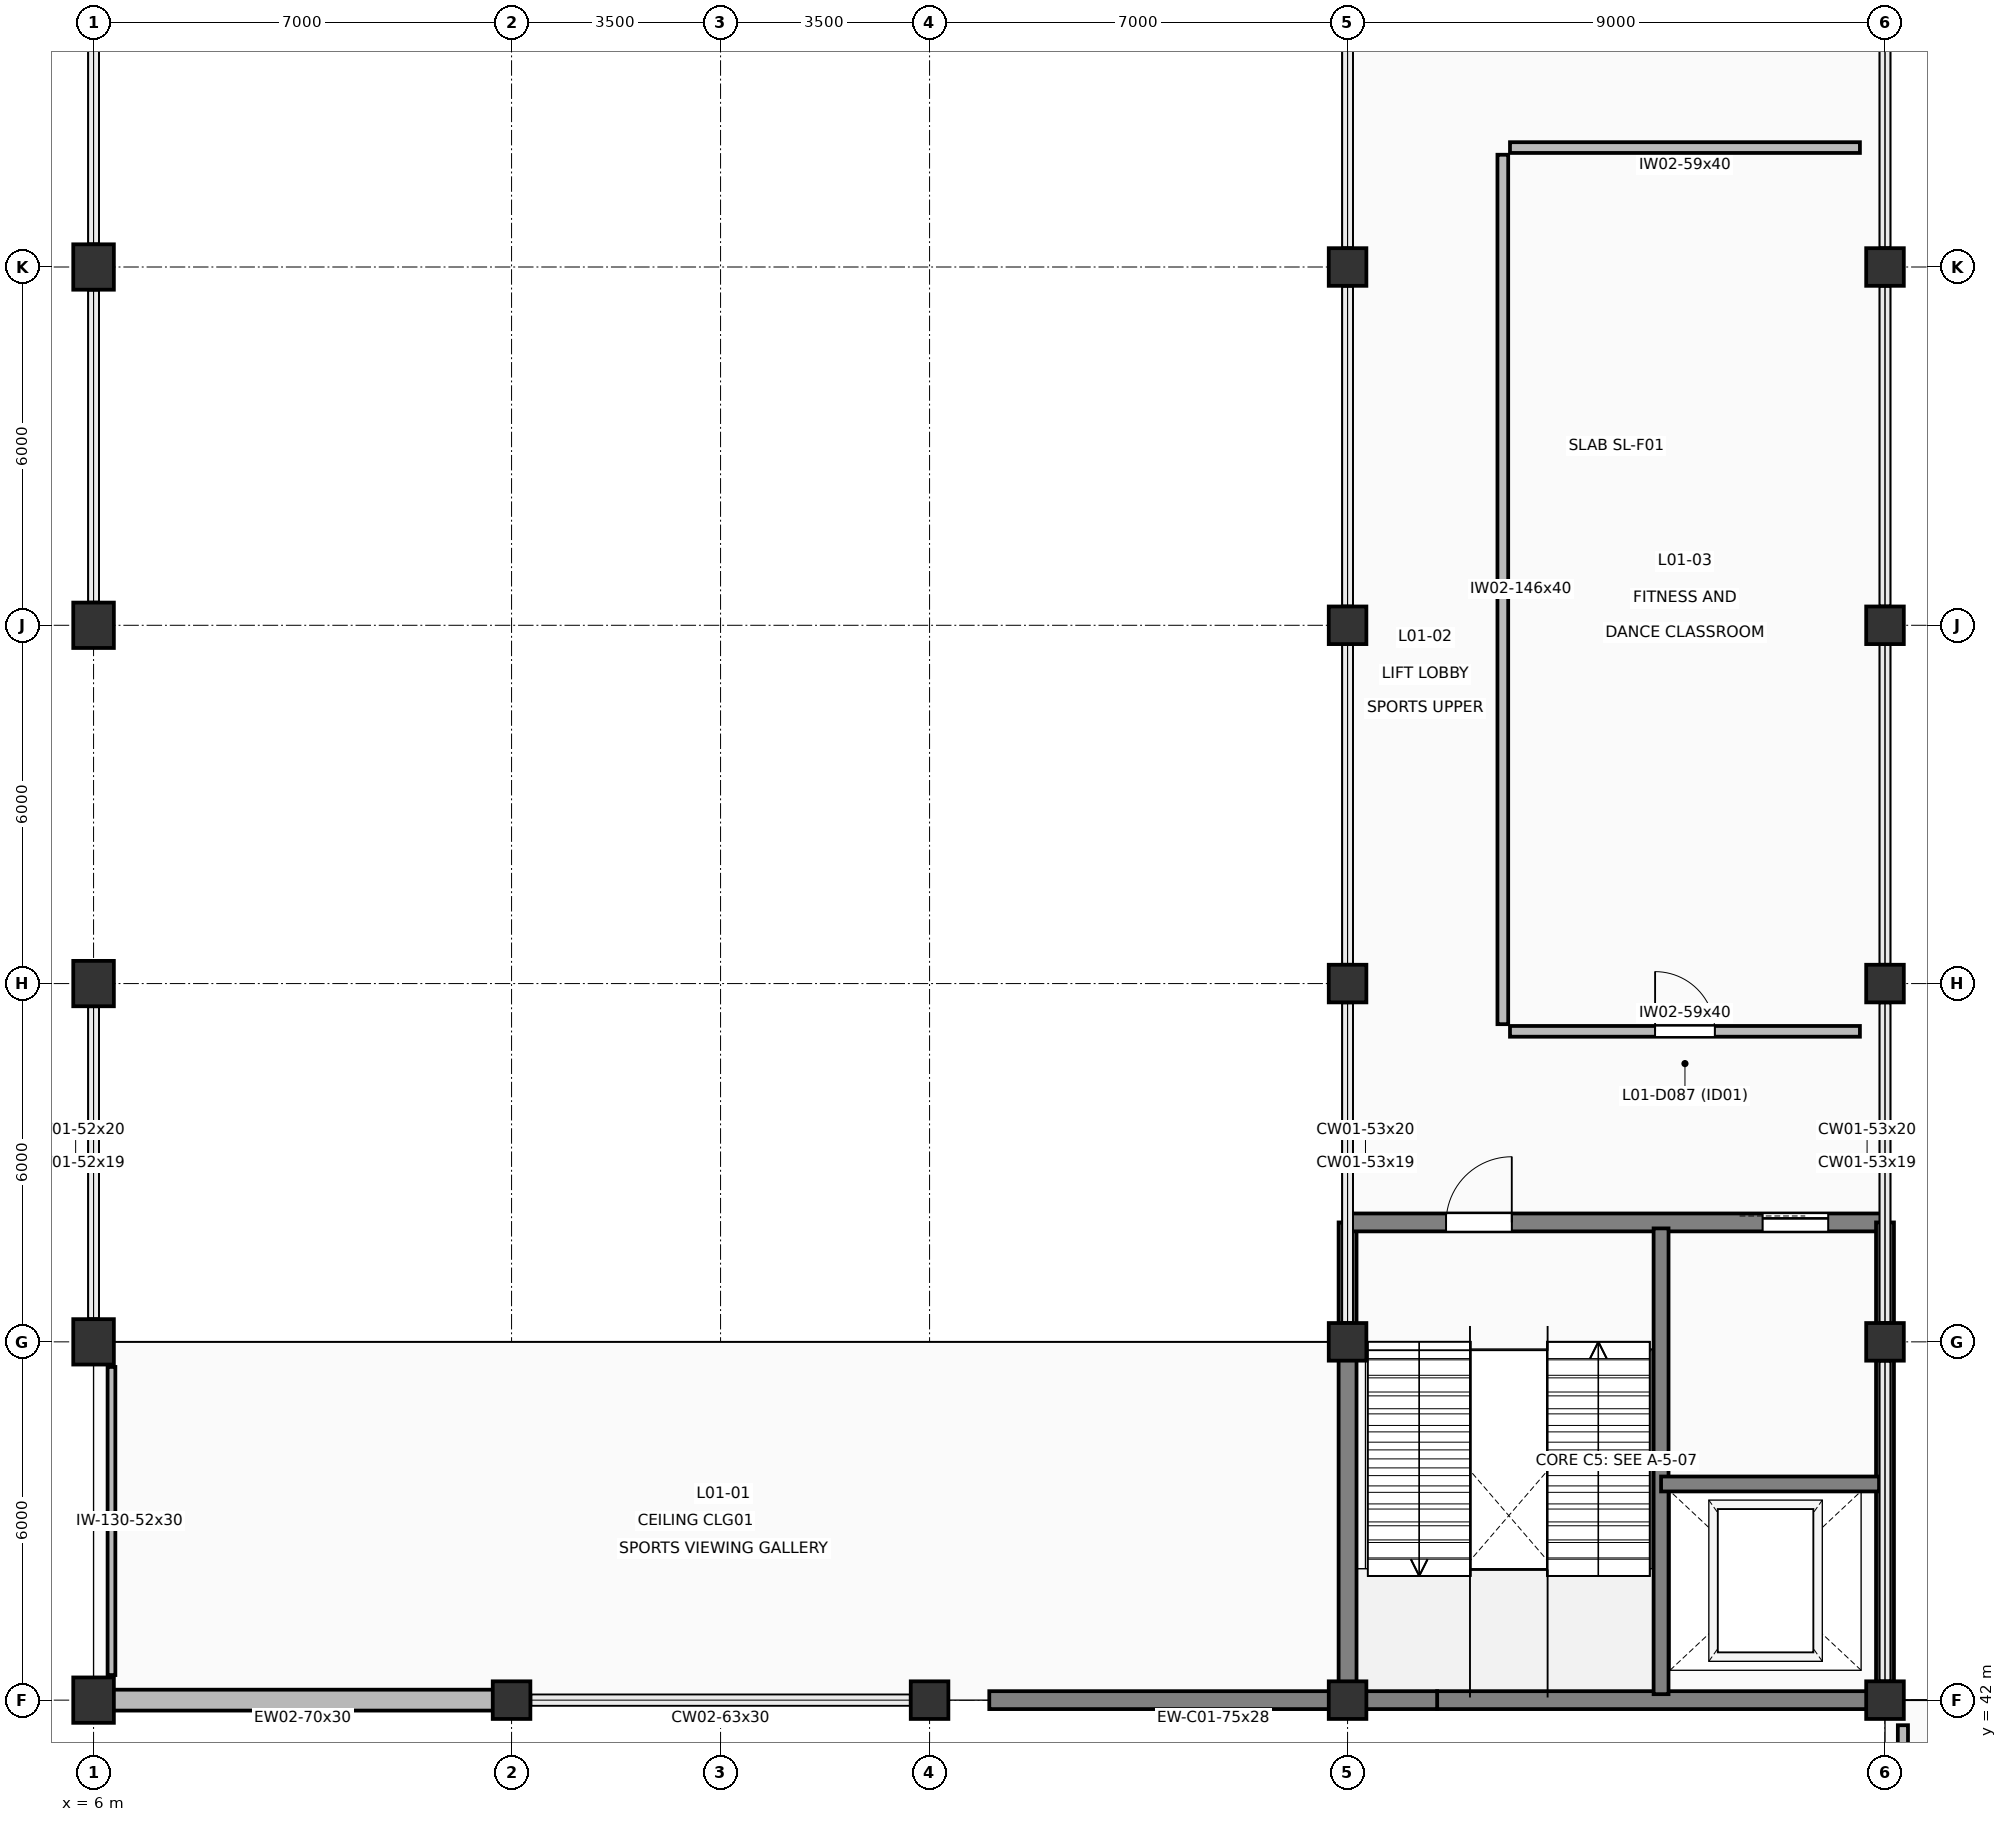
"""IFC4 building model, lengths in metres.
Left out: names, types, materials, properties, quantities, classifications, styles, units other than length and angle.
Written with IfcOpenShell. Run it as: python <this file> out.ifc"""

import sys

from ifc_helpers import new_model, si_unit, direction, frame, frame_2d, origin, origin_2d, place, context, subcontext, project, spatial, rectangle, extrude, element, fill, save


model = new_model("IFC4")
c1 = context("Model", 3, precision=1e-05, world=origin(), true_north=direction((0.0, 1.0)))
c2 = subcontext(c1, "Body", "Model", "MODEL_VIEW")
j1 = project(units=[si_unit("LENGTHUNIT", "METRE"), si_unit("PLANEANGLEUNIT", "RADIAN")], contexts=[c1])
p1 = place(None, origin())
s1 = spatial("IfcSite", under=j1, at=p1, CompositionType="ELEMENT")
p2 = place(p1, origin())
s2 = spatial("IfcBuilding", under=s1, at=p2, CompositionType="ELEMENT")
p3 = place(p2, frame((0.0, 0.0, 5.4)))
s3 = spatial("IfcBuildingStorey", under=s2, at=p3, CompositionType="ELEMENT", Elevation=5.4)
for number, where, z_axis, x_axis in (
    (1, (6.0, 42.0, 0.0), (0.0, 0.0, 1.0), (1.0, 0.0, 0.0)),
    (2, (6.0, 48.0, 0.0), (0.0, 0.0, 1.0), (1.0, 0.0, 0.0)),
    (3, (6.0, 54.0, 0.0), (0.0, 0.0, 1.0), (1.0, 0.0, 0.0)),
    (4, (6.0, 60.0, 0.0), (0.0, 0.0, 1.0), (1.0, 0.0, 0.0)),
    (5, (6.0, 66.0, 0.0), (0.0, 0.0, 1.0), (1.0, 0.0, 0.0)),
):
    element("IfcColumn", number, at=place(p3, frame(where, z_axis=z_axis, x_axis=x_axis)), inside=s3, PredefinedType="PILASTER", context=c2, shape_type="SweptSolid", body=[
        extrude(rectangle(XDim=0.68, YDim=0.76, at=origin_2d()), origin(), (0.0, 0.0, 1.0), 4.2),
    ])
for number, where, z_axis, x_axis in (
    (6, (13.0, 42.0, 0.0), (0.0, 0.0, 1.0), (1.0, 0.0, 0.0)),
    (7, (20.0, 42.0, 0.0), (0.0, 0.0, 1.0), (1.0, 0.0, 0.0)),
    (8, (27.0, 42.0, 0.0), (0.0, 0.0, 1.0), (1.0, 0.0, 0.0)),
    (9, (27.0, 48.0, 0.0), (0.0, 0.0, 1.0), (1.0, 0.0, 0.0)),
    (10, (27.0, 54.0, 0.0), (0.0, 0.0, 1.0), (1.0, 0.0, 0.0)),
    (11, (27.0, 60.0, 0.0), (0.0, 0.0, 1.0), (1.0, 0.0, 0.0)),
    (12, (27.0, 66.0, 0.0), (0.0, 0.0, 1.0), (1.0, 0.0, 0.0)),
    (13, (36.0, 42.0, 0.0), (0.0, 0.0, 1.0), (1.0, 0.0, 0.0)),
    (14, (36.0, 48.0, 0.0), (0.0, 0.0, 1.0), (1.0, 0.0, 0.0)),
    (15, (36.0, 54.0, 0.0), (0.0, 0.0, 1.0), (1.0, 0.0, 0.0)),
    (16, (36.0, 60.0, 0.0), (0.0, 0.0, 1.0), (1.0, 0.0, 0.0)),
    (17, (36.0, 66.0, 0.0), (0.0, 0.0, 1.0), (1.0, 0.0, 0.0)),
):
    element("IfcColumn", number, at=place(p3, frame(where, z_axis=z_axis, x_axis=x_axis)), inside=s3, PredefinedType="COLUMN", context=c2, shape_type="SweptSolid", body=[
        extrude(rectangle(XDim=0.63, YDim=0.63, at=origin_2d()), origin(), (0.0, 0.0, 1.0), 4.2),
    ])
for number, where, z_axis, x_axis in (
    (18, (36.0, 42.0, 0.0), (0.0, 0.0, 1.0), (-1.0, 0.0, 0.0)),
    (19, (28.5, 42.0, 0.0), (0.0, 0.0, 1.0), (-1.0, 0.0, 0.0)),
):
    element("IfcWall", number, at=place(p3, frame(where, z_axis=z_axis, x_axis=x_axis)), inside=s3, PredefinedType="SOLIDWALL", context=c2, shape_type="SweptSolid", body=[
        extrude(rectangle(XDim=7.5, YDim=0.3, at=frame_2d((3.75, 0.0))), origin(), (0.0, 0.0, 1.0), 4.2),
    ])
p4 = place(p3, frame((13.0, 42.0, 0.0), z_axis=(0.0, 0.0, 1.0), x_axis=(-1.0, 0.0, 0.0)))
e20 = element("IfcWall", 20, at=p4, inside=s3, PredefinedType="SOLIDWALL", context=c2, shape_type="SweptSolid", body=[
    extrude(rectangle(XDim=7.0, YDim=0.35, at=frame_2d((3.5, 0.0))), origin(), (0.0, 0.0, 1.0), 2.965),
])
p5 = place(p3, frame((27.0, 42.0, 0.0), z_axis=(0.0, 0.0, 1.0), x_axis=(0.0, 1.0, 0.0)))
e21 = element("IfcWall", 21, at=p5, inside=s3, PredefinedType="SHEAR", context=c2, shape_type="SweptSolid", body=[
    extrude(rectangle(XDim=8.0, YDim=0.3, at=frame_2d((4.0, 0.0))), origin(), (0.0, 0.0, 1.0), 4.2),
])
p6 = place(p3, frame((27.0, 50.0, 0.0), z_axis=(0.0, 0.0, 1.0), x_axis=(1.0, 0.0, 0.0)))
e22 = element("IfcWall", 22, at=p6, inside=s3, PredefinedType="SHEAR", context=c2, shape_type="SweptSolid", body=[
    extrude(rectangle(XDim=9.0, YDim=0.3, at=frame_2d((4.5, 0.0))), origin(), (0.0, 0.0, 1.0), 4.2),
])
p7 = place(p6, frame((1.65, 0.0, 0.0)))
e23 = element("IfcOpeningElement", 23, at=p7, cuts=e22, PredefinedType="OPENING", context=c2, shape_type="SweptSolid", body=[
    extrude(rectangle(XDim=1.1, YDim=2.2, at=frame_2d((0.55, 1.1))), frame((0.0, 0.16, 0.0), z_axis=(0.0, -1.0, 0.0), x_axis=(1.0, 0.0, 0.0)), (0.0, 0.0, 1.0), 0.32),
])
p8 = place(p6, frame((6.95, 0.0, 0.0)))
e24 = element("IfcOpeningElement", 24, at=p8, cuts=e22, PredefinedType="OPENING", context=c2, shape_type="SweptSolid", body=[
    extrude(rectangle(XDim=1.1, YDim=2.2, at=frame_2d((0.55, 1.1))), frame((0.0, 0.16, 0.0), z_axis=(0.0, -1.0, 0.0), x_axis=(1.0, 0.0, 0.0)), (0.0, 0.0, 1.0), 0.32),
])
p9 = place(p3, frame((36.0, 50.0, 0.0), z_axis=(0.0, 0.0, 1.0), x_axis=(0.0, -1.0, 0.0)))
e25 = element("IfcWall", 25, at=p9, inside=s3, PredefinedType="SHEAR", context=c2, shape_type="SweptSolid", body=[
    extrude(rectangle(XDim=8.0, YDim=0.3, at=frame_2d((4.0, 0.0))), origin(), (0.0, 0.0, 1.0), 4.2),
])
p10 = place(p3, frame((32.25, 42.1, 0.0), z_axis=(0.0, 0.0, 1.0), x_axis=(0.0, 1.0, 0.0)))
e26 = element("IfcWall", 26, at=p10, inside=s3, PredefinedType="SHEAR", context=c2, shape_type="SweptSolid", body=[
    extrude(rectangle(XDim=7.8, YDim=0.25, at=frame_2d((3.9, 0.0))), origin(), (0.0, 0.0, 1.0), 4.2),
])
p11 = place(p3, frame((32.25, 45.62, 0.0), z_axis=(0.0, 0.0, 1.0), x_axis=(1.0, 0.0, 0.0)))
e27 = element("IfcWall", 27, at=p11, inside=s3, PredefinedType="SHEAR", context=c2, shape_type="SweptSolid", body=[
    extrude(rectangle(XDim=3.65, YDim=0.25, at=frame_2d((1.825, 0.0))), origin(), (0.0, 0.0, 1.0), 4.2),
])
p12 = place(p3, frame((6.3, 47.58, 0.0), z_axis=(0.0, 0.0, 1.0), x_axis=(0.0, -1.0, 0.0)))
e28 = element("IfcWall", 28, at=p12, inside=s3, PredefinedType="PARTITIONING", context=c2, shape_type="SweptSolid", body=[
    extrude(rectangle(XDim=5.16, YDim=0.13, at=frame_2d((2.58, 0.0))), origin(), (0.0, 0.0, 1.0), 2.965),
])
p13 = place(p3, frame((29.72, 53.2, 0.0), z_axis=(0.0, 0.0, 1.0), x_axis=(1.0, 0.0, 0.0)))
e29 = element("IfcWall", 29, at=p13, inside=s3, PredefinedType="PARTITIONING", context=c2, shape_type="SweptSolid", body=[
    extrude(rectangle(XDim=5.86, YDim=0.18, at=frame_2d((2.93, 0.0))), origin(), (0.0, 0.0, 1.0), 3.98),
])
p14 = place(p13, frame((2.43, 0.0, 0.0)))
e30 = element("IfcOpeningElement", 30, at=p14, cuts=e29, PredefinedType="OPENING", context=c2, shape_type="SweptSolid", body=[
    extrude(rectangle(XDim=1.0, YDim=2.15, at=frame_2d((0.5, 1.075))), frame((0.0, 0.1, 0.0), z_axis=(0.0, -1.0, 0.0), x_axis=(1.0, 0.0, 0.0)), (0.0, 0.0, 1.0), 0.2),
])
p15 = place(p3, frame((35.58, 68.0, 0.0), z_axis=(0.0, 0.0, 1.0), x_axis=(-1.0, 0.0, 0.0)))
e31 = element("IfcWall", 31, at=p15, inside=s3, PredefinedType="PARTITIONING", context=c2, shape_type="SweptSolid", body=[
    extrude(rectangle(XDim=5.86, YDim=0.18, at=frame_2d((2.93, 0.0))), origin(), (0.0, 0.0, 1.0), 3.98),
])
p16 = place(p3, frame((29.6, 67.88, 0.0), z_axis=(0.0, 0.0, 1.0), x_axis=(0.0, -1.0, 0.0)))
e32 = element("IfcWall", 32, at=p16, inside=s3, PredefinedType="PARTITIONING", context=c2, shape_type="SweptSolid", body=[
    extrude(rectangle(XDim=14.56, YDim=0.18, at=frame_2d((7.28, 0.0))), origin(), (0.0, 0.0, 1.0), 3.98),
])
p17 = place(p3, frame((36.3, 41.58, 0.0), z_axis=(0.0, 0.0, 1.0), x_axis=(0.0, -1.0, 0.0)))
e33 = element("IfcWall", 33, at=p17, inside=s3, PredefinedType="PARTITIONING", context=c2, shape_type="SweptSolid", body=[
    extrude(rectangle(XDim=5.26, YDim=0.17, at=frame_2d((2.63, 0.0))), origin(), (0.0, 0.0, 1.0), 2.965),
])
p18 = place(p7, origin())
e34 = element("IfcDoor", 34, at=p18, inside=s3, OperationType="SINGLE_SWING_RIGHT", PredefinedType="DOOR", context=c2, shape_type="SweptSolid", body=[
    extrude(rectangle(XDim=1.1, YDim=2.2, at=frame_2d((0.55, 1.1))), frame((0.0, 0.025, 0.0), z_axis=(0.0, -1.0, 0.0), x_axis=(1.0, 0.0, 0.0)), (0.0, 0.0, 1.0), 0.05),
])
fill(e23, e34)
p19 = place(p8, origin())
e35 = element("IfcDoor", 35, at=p19, inside=s3, OperationType="SLIDING_TO_LEFT", PredefinedType="DOOR", context=c2, shape_type="SweptSolid", body=[
    extrude(rectangle(XDim=1.1, YDim=2.2, at=frame_2d((0.55, 1.1))), frame((0.0, 0.025, 0.0), z_axis=(0.0, -1.0, 0.0), x_axis=(1.0, 0.0, 0.0)), (0.0, 0.0, 1.0), 0.05),
])
fill(e24, e35)
p20 = place(p14, origin())
e36 = element("IfcDoor", 36, at=p20, inside=s3, OperationType="SINGLE_SWING_LEFT", PredefinedType="DOOR", context=c2, shape_type="SweptSolid", body=[
    extrude(rectangle(XDim=1.0, YDim=2.15, at=frame_2d((0.5, 1.075))), frame((0.0, 0.025, 0.0), z_axis=(0.0, -1.0, 0.0), x_axis=(1.0, 0.0, 0.0)), (0.0, 0.0, 1.0), 0.05),
])
fill(e30, e36)
save(model, sys.argv[1])
